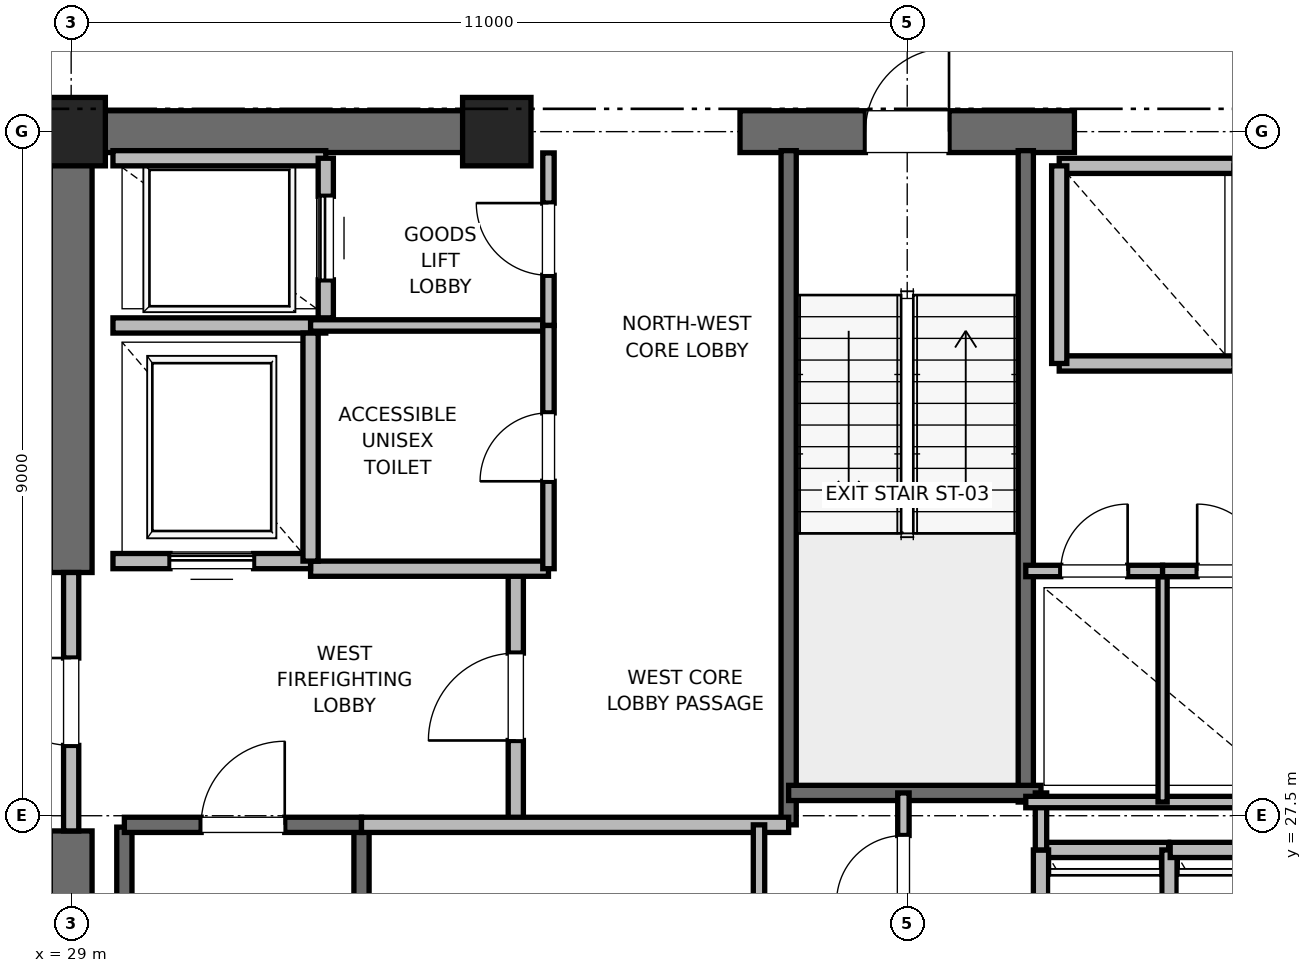
"""IFC4 building model, lengths in metres.
Left out: names, types, materials, properties, quantities, classifications, styles, units other than length and angle.
Written with IfcOpenShell. Run it as: python <this file> out.ifc"""

import sys

from ifc_helpers import new_model, si_unit, direction, frame, frame_2d, origin, origin_2d, place, context, subcontext, project, spatial, rectangle, extrude, element, fill, save


model = new_model("IFC4")
c1 = context("Model", 3, precision=1e-05, world=origin(), true_north=direction((0.0, 1.0)))
c2 = subcontext(c1, "Body", "Model", "MODEL_VIEW")
j1 = project(units=[si_unit("LENGTHUNIT", "METRE"), si_unit("PLANEANGLEUNIT", "RADIAN")], contexts=[c1])
p1 = place(None, origin())
s1 = spatial("IfcSite", under=j1, at=p1, CompositionType="ELEMENT")
p2 = place(p1, origin())
s2 = spatial("IfcBuilding", under=s1, at=p2, CompositionType="ELEMENT")
p3 = place(p2, frame((0.0, 0.0, 205.2)))
s3 = spatial("IfcBuildingStorey", under=s2, at=p3, CompositionType="ELEMENT", Elevation=205.2)
for number, where, z_axis, x_axis in (
    (1, (29.0, 36.5, 0.0), (0.0, 0.0, 1.0), (1.0, 0.0, 0.0)),
    (2, (34.6, 36.5, 0.0), (0.0, 0.0, 1.0), (1.0, 0.0, 0.0)),
):
    element("IfcColumn", number, at=place(p3, frame(where, z_axis=z_axis, x_axis=x_axis)), inside=s3, PredefinedType="PILASTER", context=c2, shape_type="SweptSolid", body=[
        extrude(rectangle(XDim=0.9, YDim=0.9, at=origin_2d()), origin(), (0.0, 0.0, 1.0), 4.0),
    ])
p4 = place(p3, frame((29.0, 36.5, 0.0), z_axis=(0.0, 0.0, 1.0), x_axis=(1.0, 0.0, 0.0)))
e3 = element("IfcWall", 3, at=p4, inside=s3, PredefinedType="SHEAR", context=c2, shape_type="SweptSolid", body=[
    extrude(rectangle(XDim=5.8, YDim=0.55, at=frame_2d((2.9, 0.0))), origin(), (0.0, 0.0, 1.0), 3.775),
])
p5 = place(p3, frame((37.8, 36.5, 0.0), z_axis=(0.0, 0.0, 1.0), x_axis=(1.0, 0.0, 0.0)))
e4 = element("IfcWall", 4, at=p5, inside=s3, PredefinedType="SHEAR", context=c2, shape_type="SweptSolid", body=[
    extrude(rectangle(XDim=4.4, YDim=0.55, at=frame_2d((2.2, 0.0))), origin(), (0.0, 0.0, 1.0), 3.775),
])
p6 = place(p5, frame((1.65, 0.0, 0.0)))
e5 = element("IfcOpeningElement", 5, at=p6, cuts=e4, PredefinedType="OPENING", context=c2, shape_type="SweptSolid", body=[
    extrude(rectangle(XDim=1.1, YDim=2.15, at=frame_2d((0.55, 1.075))), frame((0.0, 0.275, 0.0), z_axis=(0.0, -1.0, 0.0), x_axis=(1.0, 0.0, 0.0)), (0.0, 0.0, 1.0), 0.55),
])
p7 = place(p3, frame((29.0, 18.5, 0.0), z_axis=(0.0, 0.0, 1.0), x_axis=(0.0, 1.0, 0.0)))
e6 = element("IfcWall", 6, at=p7, inside=s3, PredefinedType="SHEAR", context=c2, shape_type="SweptSolid", body=[
    extrude(rectangle(XDim=8.8, YDim=0.55, at=frame_2d((4.4, 0.0))), origin(), (0.0, 0.0, 1.0), 3.775),
])
p8 = place(p3, frame((29.0, 30.7, 0.0), z_axis=(0.0, 0.0, 1.0), x_axis=(0.0, 1.0, 0.0)))
e7 = element("IfcWall", 7, at=p8, inside=s3, PredefinedType="SHEAR", context=c2, shape_type="SweptSolid", body=[
    extrude(rectangle(XDim=5.8, YDim=0.55, at=frame_2d((2.9, 0.0))), origin(), (0.0, 0.0, 1.0), 3.775),
])
p9 = place(p3, frame((29.7, 19.2, 0.0), z_axis=(0.0, 0.0, 1.0), x_axis=(0.0, 1.0, 0.0)))
e8 = element("IfcWall", 8, at=p9, inside=s3, PredefinedType="SOLIDWALL", context=c2, shape_type="SweptSolid", body=[
    extrude(rectangle(XDim=8.15, YDim=0.2, at=frame_2d((4.075, 0.0))), origin(), (0.0, 0.0, 1.0), 3.775),
])
p10 = place(p3, frame((32.82, 18.6, 0.0), z_axis=(0.0, 0.0, 1.0), x_axis=(0.0, 1.0, 0.0)))
e9 = element("IfcWall", 9, at=p10, inside=s3, PredefinedType="SOLIDWALL", context=c2, shape_type="SweptSolid", body=[
    extrude(rectangle(XDim=8.78, YDim=0.2, at=frame_2d((4.39, 0.0))), origin(), (0.0, 0.0, 1.0), 3.775),
])
p11 = place(p3, frame((29.7, 27.38, 0.0), z_axis=(0.0, 0.0, 1.0), x_axis=(1.0, 0.0, 0.0)))
e10 = element("IfcWall", 10, at=p11, inside=s3, PredefinedType="SOLIDWALL", context=c2, shape_type="SweptSolid", body=[
    extrude(rectangle(XDim=3.12, YDim=0.2, at=frame_2d((1.56, 0.0))), origin(), (0.0, 0.0, 1.0), 3.775),
])
p12 = place(p11, frame((1.01, 0.0, 0.0)))
e11 = element("IfcOpeningElement", 11, at=p12, cuts=e10, PredefinedType="OPENING", context=c2, shape_type="SweptSolid", body=[
    extrude(rectangle(XDim=1.1, YDim=2.15, at=frame_2d((0.55, 1.075))), frame((0.0, 0.1, 0.0), z_axis=(0.0, -1.0, 0.0), x_axis=(1.0, 0.0, 0.0)), (0.0, 0.0, 1.0), 0.2),
])
p13 = place(p3, frame((38.44, 27.38, 0.0), z_axis=(0.0, 0.0, 1.0), x_axis=(0.0, 1.0, 0.0)))
e12 = element("IfcWall", 12, at=p13, inside=s3, PredefinedType="SOLIDWALL", context=c2, shape_type="SweptSolid", body=[
    extrude(rectangle(XDim=8.87, YDim=0.2, at=frame_2d((4.435, 0.0))), origin(), (0.0, 0.0, 1.0), 3.775),
])
p14 = place(p3, frame((41.56, 27.68, 0.0), z_axis=(0.0, 0.0, 1.0), x_axis=(0.0, 1.0, 0.0)))
e13 = element("IfcWall", 13, at=p14, inside=s3, PredefinedType="SOLIDWALL", context=c2, shape_type="SweptSolid", body=[
    extrude(rectangle(XDim=8.57, YDim=0.2, at=frame_2d((4.285, 0.0))), origin(), (0.0, 0.0, 1.0), 3.775),
])
p15 = place(p3, frame((38.44, 27.8, 0.0), z_axis=(0.0, 0.0, 1.0), x_axis=(1.0, 0.0, 0.0)))
e14 = element("IfcWall", 14, at=p15, inside=s3, PredefinedType="SOLIDWALL", context=c2, shape_type="SweptSolid", body=[
    extrude(rectangle(XDim=3.32, YDim=0.2, at=frame_2d((1.66, 0.0))), origin(), (0.0, 0.0, 1.0), 3.775),
])
p16 = place(p3, frame((34.85, 27.38, 0.0), z_axis=(0.0, 0.0, 1.0), x_axis=(0.0, 1.0, 0.0)))
e15 = element("IfcWall", 15, at=p16, inside=s3, PredefinedType="PARTITIONING", context=c2, shape_type="SweptSolid", body=[
    extrude(rectangle(XDim=3.37, YDim=0.2, at=frame_2d((1.685, 0.0))), origin(), (0.0, 0.0, 1.0), 3.775),
])
p17 = place(p16, frame((1.11, 0.0, 0.0)))
e16 = element("IfcOpeningElement", 16, at=p17, cuts=e15, PredefinedType="OPENING", context=c2, shape_type="SweptSolid", body=[
    extrude(rectangle(XDim=1.15, YDim=2.2, at=frame_2d((0.575, 1.1))), frame((0.0, 0.1, 0.0), z_axis=(0.0, -1.0, 0.0), x_axis=(1.0, 0.0, 0.0)), (0.0, 0.0, 1.0), 0.2),
])
p18 = place(p3, frame((29.0, 27.3, 0.0), z_axis=(0.0, 0.0, 1.0), x_axis=(0.0, 1.0, 0.0)))
e17 = element("IfcWall", 17, at=p18, inside=s3, PredefinedType="PARTITIONING", context=c2, shape_type="SweptSolid", body=[
    extrude(rectangle(XDim=3.4, YDim=0.2, at=frame_2d((1.7, 0.0))), origin(), (0.0, 0.0, 1.0), 2.755),
])
p19 = place(p18, frame((1.125, 0.0, 0.0)))
e18 = element("IfcOpeningElement", 18, at=p19, cuts=e17, PredefinedType="OPENING", context=c2, shape_type="SweptSolid", body=[
    extrude(rectangle(XDim=1.15, YDim=2.2, at=frame_2d((0.575, 1.1))), frame((0.0, 0.1, 0.0), z_axis=(0.0, -1.0, 0.0), x_axis=(1.0, 0.0, 0.0)), (0.0, 0.0, 1.0), 0.2),
])
p20 = place(p3, frame((32.82, 27.38, 0.0), z_axis=(0.0, 0.0, 1.0), x_axis=(1.0, 0.0, 0.0)))
e19 = element("IfcWall", 19, at=p20, inside=s3, PredefinedType="PARTITIONING", context=c2, shape_type="SweptSolid", body=[
    extrude(rectangle(XDim=5.62, YDim=0.2, at=frame_2d((2.81, 0.0))), origin(), (0.0, 0.0, 1.0), 3.775),
])
p21 = place(p3, frame((32.15, 30.75, 0.0), z_axis=(0.0, 0.0, 1.0), x_axis=(1.0, 0.0, 0.0)))
e20 = element("IfcWall", 20, at=p21, inside=s3, PredefinedType="PARTITIONING", context=c2, shape_type="SweptSolid", body=[
    extrude(rectangle(XDim=3.13, YDim=0.2, at=frame_2d((1.565, 0.0))), origin(), (0.0, 0.0, 1.0), 3.775),
])
p22 = place(p3, frame((29.55, 30.85, 0.0), z_axis=(0.0, 0.0, 1.0), x_axis=(1.0, 0.0, 0.0)))
e21 = element("IfcWall", 21, at=p22, inside=s3, PredefinedType="SOLIDWALL", context=c2, shape_type="SweptSolid", body=[
    extrude(rectangle(XDim=2.6, YDim=0.2, at=frame_2d((1.3, 0.0))), origin(), (0.0, 0.0, 1.0), 2.755),
])
p23 = place(p22, frame((0.75, 0.0, 0.0)))
e22 = element("IfcOpeningElement", 22, at=p23, cuts=e21, PredefinedType="OPENING", context=c2, shape_type="SweptSolid", body=[
    extrude(rectangle(XDim=1.1, YDim=2.2, at=frame_2d((0.55, 1.1))), frame((0.0, 0.1, 0.0), z_axis=(0.0, -1.0, 0.0), x_axis=(1.0, 0.0, 0.0)), (0.0, 0.0, 1.0), 0.2),
])
p24 = place(p3, frame((29.55, 33.95, 0.0), z_axis=(0.0, 0.0, 1.0), x_axis=(1.0, 0.0, 0.0)))
e23 = element("IfcWall", 23, at=p24, inside=s3, PredefinedType="SOLIDWALL", context=c2, shape_type="SweptSolid", body=[
    extrude(rectangle(XDim=2.8, YDim=0.2, at=frame_2d((1.4, 0.0))), origin(), (0.0, 0.0, 1.0), 3.775),
])
p25 = place(p3, frame((32.15, 30.85, 0.0), z_axis=(0.0, 0.0, 1.0), x_axis=(0.0, 1.0, 0.0)))
e24 = element("IfcWall", 24, at=p25, inside=s3, PredefinedType="SOLIDWALL", context=c2, shape_type="SweptSolid", body=[
    extrude(rectangle(XDim=3.0, YDim=0.2, at=frame_2d((1.5, 0.0))), origin(), (0.0, 0.0, 1.0), 3.775),
])
p26 = place(p3, frame((32.35, 36.15, 0.0), z_axis=(0.0, 0.0, 1.0), x_axis=(-1.0, 0.0, 0.0)))
e25 = element("IfcWall", 25, at=p26, inside=s3, PredefinedType="SOLIDWALL", context=c2, shape_type="SweptSolid", body=[
    extrude(rectangle(XDim=2.8, YDim=0.2, at=frame_2d((1.4, 0.0))), origin(), (0.0, 0.0, 1.0), 3.062),
])
p27 = place(p3, frame((32.35, 34.05, 0.0), z_axis=(0.0, 0.0, 1.0), x_axis=(0.0, 1.0, 0.0)))
e26 = element("IfcWall", 26, at=p27, inside=s3, PredefinedType="SOLIDWALL", context=c2, shape_type="SweptSolid", body=[
    extrude(rectangle(XDim=2.1, YDim=0.2, at=frame_2d((1.05, 0.0))), origin(), (0.0, 0.0, 1.0), 3.775),
])
p28 = place(p27, frame((0.5, 0.0, 0.0)))
e27 = element("IfcOpeningElement", 27, at=p28, cuts=e26, PredefinedType="OPENING", context=c2, shape_type="SweptSolid", body=[
    extrude(rectangle(XDim=1.1, YDim=2.2, at=frame_2d((0.55, 1.1))), frame((0.0, 0.1, 0.0), z_axis=(0.0, -1.0, 0.0), x_axis=(1.0, 0.0, 0.0)), (0.0, 0.0, 1.0), 0.2),
])
p29 = place(p3, frame((43.44, 27.05, 0.0), z_axis=(0.0, 0.0, 1.0), x_axis=(-1.0, 0.0, 0.0)))
e28 = element("IfcWall", 28, at=p29, inside=s3, PredefinedType="SOLIDWALL", context=c2, shape_type="SweptSolid", body=[
    extrude(rectangle(XDim=1.68, YDim=0.2, at=frame_2d((0.84, 0.0))), origin(), (0.0, 0.0, 1.0), 3.775),
])
for number, where, z_axis, x_axis in (
    (29, (41.76, 27.05, 0.0), (0.0, 0.0, 1.0), (0.0, -1.0, 0.0)),
    (30, (43.45, 24.45, 0.0), (0.0, 0.0, 1.0), (0.0, 1.0, 0.0)),
):
    element("IfcWall", number, at=place(p3, frame(where, z_axis=z_axis, x_axis=x_axis)), inside=s3, PredefinedType="SOLIDWALL", context=c2, shape_type="SweptSolid", body=[
        extrude(rectangle(XDim=2.6, YDim=0.2, at=frame_2d((1.3, 0.0))), origin(), (0.0, 0.0, 1.0), 3.775),
    ])
p30 = place(p3, frame((45.12, 27.05, 0.0), z_axis=(0.0, 0.0, 1.0), x_axis=(-1.0, 0.0, 0.0)))
e31 = element("IfcWall", 31, at=p30, inside=s3, PredefinedType="SOLIDWALL", context=c2, shape_type="SweptSolid", body=[
    extrude(rectangle(XDim=1.66, YDim=0.2, at=frame_2d((0.83, 0.0))), origin(), (0.0, 0.0, 1.0), 3.775),
])
p31 = place(p3, frame((42.0, 33.45, 0.0), z_axis=(0.0, 0.0, 1.0), x_axis=(1.0, 0.0, 0.0)))
e32 = element("IfcWall", 32, at=p31, inside=s3, PredefinedType="SOLIDWALL", context=c2, shape_type="SweptSolid", body=[
    extrude(rectangle(XDim=2.3, YDim=0.2, at=frame_2d((1.15, 0.0))), origin(), (0.0, 0.0, 1.0), 3.775),
])
p32 = place(p3, frame((44.3, 36.05, 0.0), z_axis=(0.0, 0.0, 1.0), x_axis=(-1.0, 0.0, 0.0)))
e33 = element("IfcWall", 33, at=p32, inside=s3, PredefinedType="SOLIDWALL", context=c2, shape_type="SweptSolid", body=[
    extrude(rectangle(XDim=2.3, YDim=0.2, at=frame_2d((1.15, 0.0))), origin(), (0.0, 0.0, 1.0), 2.755),
])
p33 = place(p3, frame((42.0, 36.05, 0.0), z_axis=(0.0, 0.0, 1.0), x_axis=(0.0, -1.0, 0.0)))
e34 = element("IfcWall", 34, at=p33, inside=s3, PredefinedType="SOLIDWALL", context=c2, shape_type="SweptSolid", body=[
    extrude(rectangle(XDim=2.6, YDim=0.2, at=frame_2d((1.3, 0.0))), origin(), (0.0, 0.0, 1.0), 2.755),
])
p34 = place(p3, frame((41.76, 27.05, 0.0), z_axis=(0.0, 0.0, 1.0), x_axis=(0.0, 1.0, 0.0)))
e35 = element("IfcWall", 35, at=p34, inside=s3, PredefinedType="PARTITIONING", context=c2, shape_type="SweptSolid", body=[
    extrude(rectangle(XDim=0.75, YDim=0.15, at=frame_2d((0.375, 0.0))), origin(), (0.0, 0.0, 1.0), 2.85),
])
p35 = place(p3, frame((39.95, 25.8, 0.0), z_axis=(0.0, 0.0, 1.0), x_axis=(0.0, 1.0, 0.0)))
e36 = element("IfcWall", 36, at=p35, inside=s3, PredefinedType="PARTITIONING", context=c2, shape_type="SweptSolid", body=[
    extrude(rectangle(XDim=2.0, YDim=0.15, at=frame_2d((1.0, 0.0))), origin(), (0.0, 0.0, 1.0), 2.85),
])
p36 = place(p35, frame((0.56, 0.0, 0.0)))
e37 = element("IfcOpeningElement", 37, at=p36, cuts=e36, PredefinedType="OPENING", context=c2, shape_type="SweptSolid", body=[
    extrude(rectangle(XDim=0.88, YDim=2.1, at=frame_2d((0.44, 1.05))), frame((0.0, 0.075, 0.0), z_axis=(0.0, -1.0, 0.0), x_axis=(1.0, 0.0, 0.0)), (0.0, 0.0, 1.0), 0.15),
])
p37 = place(p3, frame((32.15, 33.95, 0.0), z_axis=(0.0, 0.0, 1.0), x_axis=(1.0, 0.0, 0.0)))
e38 = element("IfcWall", 38, at=p37, inside=s3, PredefinedType="PARTITIONING", context=c2, shape_type="SweptSolid", body=[
    extrude(rectangle(XDim=3.13, YDim=0.15, at=frame_2d((1.565, 0.0))), origin(), (0.0, 0.0, 1.0), 2.85),
])
p38 = place(p3, frame((35.28, 33.95, 0.0), z_axis=(0.0, 0.0, 1.0), x_axis=(0.0, 1.0, 0.0)))
e39 = element("IfcWall", 39, at=p38, inside=s3, PredefinedType="PARTITIONING", context=c2, shape_type="SweptSolid", body=[
    extrude(rectangle(XDim=2.27, YDim=0.15, at=frame_2d((1.135, 0.0))), origin(), (0.0, 0.0, 1.0), 2.755),
])
p39 = place(p38, frame((0.66, 0.0, 0.0)))
e40 = element("IfcOpeningElement", 40, at=p39, cuts=e39, PredefinedType="OPENING", context=c2, shape_type="SweptSolid", body=[
    extrude(rectangle(XDim=0.95, YDim=2.15, at=frame_2d((0.475, 1.075))), frame((0.0, 0.075, 0.0), z_axis=(0.0, -1.0, 0.0), x_axis=(1.0, 0.0, 0.0)), (0.0, 0.0, 1.0), 0.15),
])
p40 = place(p3, frame((35.28, 30.75, 0.0), z_axis=(0.0, 0.0, 1.0), x_axis=(0.0, 1.0, 0.0)))
e41 = element("IfcWall", 41, at=p40, inside=s3, PredefinedType="PARTITIONING", context=c2, shape_type="SweptSolid", body=[
    extrude(rectangle(XDim=3.2, YDim=0.15, at=frame_2d((1.6, 0.0))), origin(), (0.0, 0.0, 1.0), 2.85),
])
p41 = place(p40, frame((1.15, 0.0, 0.0)))
e42 = element("IfcOpeningElement", 42, at=p41, cuts=e41, PredefinedType="OPENING", context=c2, shape_type="SweptSolid", body=[
    extrude(rectangle(XDim=0.9, YDim=2.1, at=frame_2d((0.45, 1.05))), frame((0.0, 0.075, 0.0), z_axis=(0.0, -1.0, 0.0), x_axis=(1.0, 0.0, 0.0)), (0.0, 0.0, 1.0), 0.15),
])
p42 = place(p3, frame((38.05, 23.06, 0.0), z_axis=(0.0, 0.0, 1.0), x_axis=(0.0, 1.0, 0.0)))
e43 = element("IfcWall", 43, at=p42, inside=s3, PredefinedType="PARTITIONING", context=c2, shape_type="SweptSolid", body=[
    extrude(rectangle(XDim=4.32, YDim=0.15, at=frame_2d((2.16, 0.0))), origin(), (0.0, 0.0, 1.0), 2.85),
])
p43 = place(p42, frame((1.66, 0.0, 0.0)))
e44 = element("IfcOpeningElement", 44, at=p43, cuts=e43, PredefinedType="OPENING", context=c2, shape_type="SweptSolid", body=[
    extrude(rectangle(XDim=1.0, YDim=2.15, at=frame_2d((0.5, 1.075))), frame((0.0, 0.075, 0.0), z_axis=(0.0, -1.0, 0.0), x_axis=(1.0, 0.0, 0.0)), (0.0, 0.0, 1.0), 0.15),
])
p44 = place(p3, frame((41.56, 27.68, 0.0), z_axis=(0.0, 0.0, 1.0), x_axis=(1.0, 0.0, 0.0)))
e45 = element("IfcWall", 45, at=p44, inside=s3, PredefinedType="PARTITIONING", context=c2, shape_type="SweptSolid", body=[
    extrude(rectangle(XDim=3.59, YDim=0.15, at=frame_2d((1.795, 0.0))), origin(), (0.0, 0.0, 1.0), 2.85),
])
p45 = place(p3, frame((43.36, 27.68, 0.0), z_axis=(0.0, 0.0, 1.0), x_axis=(0.0, 1.0, 0.0)))
e46 = element("IfcWall", 46, at=p45, inside=s3, PredefinedType="PARTITIONING", context=c2, shape_type="SweptSolid", body=[
    extrude(rectangle(XDim=3.04, YDim=0.12, at=frame_2d((1.52, 0.0))), origin(), (0.0, 0.0, 1.0), 2.85),
])
p46 = place(p3, frame((41.56, 30.72, 0.0), z_axis=(0.0, 0.0, 1.0), x_axis=(1.0, 0.0, 0.0)))
e47 = element("IfcWall", 47, at=p46, inside=s3, PredefinedType="PARTITIONING", context=c2, shape_type="SweptSolid", body=[
    extrude(rectangle(XDim=1.8, YDim=0.15, at=frame_2d((0.9, 0.0))), origin(), (0.0, 0.0, 1.0), 2.85),
])
p47 = place(p46, frame((0.46, 0.0, 0.0)))
e48 = element("IfcOpeningElement", 48, at=p47, cuts=e47, PredefinedType="OPENING", context=c2, shape_type="SweptSolid", body=[
    extrude(rectangle(XDim=0.88, YDim=2.1, at=frame_2d((0.44, 1.05))), frame((0.0, 0.075, 0.0), z_axis=(0.0, -1.0, 0.0), x_axis=(1.0, 0.0, 0.0)), (0.0, 0.0, 1.0), 0.15),
])
p48 = place(p3, frame((43.36, 30.72, 0.0), z_axis=(0.0, 0.0, 1.0), x_axis=(1.0, 0.0, 0.0)))
e49 = element("IfcWall", 49, at=p48, inside=s3, PredefinedType="PARTITIONING", context=c2, shape_type="SweptSolid", body=[
    extrude(rectangle(XDim=1.79, YDim=0.15, at=frame_2d((0.895, 0.0))), origin(), (0.0, 0.0, 1.0), 2.85),
])
p49 = place(p48, frame((0.455, 0.0, 0.0)))
e50 = element("IfcOpeningElement", 50, at=p49, cuts=e49, PredefinedType="OPENING", context=c2, shape_type="SweptSolid", body=[
    extrude(rectangle(XDim=0.88, YDim=2.1, at=frame_2d((0.44, 1.05))), frame((0.0, 0.075, 0.0), z_axis=(0.0, -1.0, 0.0), x_axis=(1.0, 0.0, 0.0)), (0.0, 0.0, 1.0), 0.15),
])
p50 = place(p12, origin())
e51 = element("IfcDoor", 51, at=p50, inside=s3, OperationType="SINGLE_SWING_RIGHT", PredefinedType="DOOR", context=c2, shape_type="SweptSolid", body=[
    extrude(rectangle(XDim=1.1, YDim=2.15, at=frame_2d((0.55, 1.075))), frame((0.0, 0.025, 0.0), z_axis=(0.0, -1.0, 0.0), x_axis=(1.0, 0.0, 0.0)), (0.0, 0.0, 1.0), 0.05),
])
fill(e11, e51)
p51 = place(p6, origin())
e52 = element("IfcDoor", 52, at=p51, inside=s3, OperationType="SINGLE_SWING_RIGHT", PredefinedType="DOOR", context=c2, shape_type="SweptSolid", body=[
    extrude(rectangle(XDim=1.1, YDim=2.15, at=frame_2d((0.55, 1.075))), frame((0.0, 0.025, 0.0), z_axis=(0.0, -1.0, 0.0), x_axis=(1.0, 0.0, 0.0)), (0.0, 0.0, 1.0), 0.05),
])
fill(e5, e52)
p52 = place(p17, origin())
e53 = element("IfcDoor", 53, at=p52, inside=s3, OperationType="SINGLE_SWING_LEFT", PredefinedType="DOOR", context=c2, shape_type="SweptSolid", body=[
    extrude(rectangle(XDim=1.15, YDim=2.2, at=frame_2d((0.575, 1.1))), frame((0.0, 0.025, 0.0), z_axis=(0.0, -1.0, 0.0), x_axis=(1.0, 0.0, 0.0)), (0.0, 0.0, 1.0), 0.05),
])
fill(e16, e53)
p53 = place(p19, origin())
e54 = element("IfcDoor", 54, at=p53, inside=s3, OperationType="SINGLE_SWING_RIGHT", PredefinedType="DOOR", context=c2, shape_type="SweptSolid", body=[
    extrude(rectangle(XDim=1.15, YDim=2.2, at=frame_2d((0.575, 1.1))), frame((0.0, 0.025, 0.0), z_axis=(0.0, -1.0, 0.0), x_axis=(1.0, 0.0, 0.0)), (0.0, 0.0, 1.0), 0.05),
])
fill(e18, e54)
p54 = place(p23, origin())
e55 = element("IfcDoor", 55, at=p54, inside=s3, OperationType="SLIDING_TO_RIGHT", PredefinedType="DOOR", context=c2, shape_type="SweptSolid", body=[
    extrude(rectangle(XDim=1.1, YDim=2.2, at=frame_2d((0.55, 1.1))), frame((0.0, 0.025, 0.0), z_axis=(0.0, -1.0, 0.0), x_axis=(1.0, 0.0, 0.0)), (0.0, 0.0, 1.0), 0.05),
])
fill(e22, e55)
p55 = place(p28, origin())
e56 = element("IfcDoor", 56, at=p55, inside=s3, OperationType="SLIDING_TO_RIGHT", PredefinedType="DOOR", context=c2, shape_type="SweptSolid", body=[
    extrude(rectangle(XDim=1.1, YDim=2.2, at=frame_2d((0.55, 1.1))), frame((0.0, 0.025, 0.0), z_axis=(0.0, -1.0, 0.0), x_axis=(1.0, 0.0, 0.0)), (0.0, 0.0, 1.0), 0.05),
])
fill(e27, e56)
p56 = place(p36, origin())
e57 = element("IfcDoor", 57, at=p56, inside=s3, OperationType="SINGLE_SWING_LEFT", PredefinedType="DOOR", context=c2, shape_type="SweptSolid", body=[
    extrude(rectangle(XDim=0.88, YDim=2.1, at=frame_2d((0.44, 1.05))), frame((0.0, 0.025, 0.0), z_axis=(0.0, -1.0, 0.0), x_axis=(1.0, 0.0, 0.0)), (0.0, 0.0, 1.0), 0.05),
])
fill(e37, e57)
p57 = place(p39, origin())
e58 = element("IfcDoor", 58, at=p57, inside=s3, OperationType="SINGLE_SWING_RIGHT", PredefinedType="DOOR", context=c2, shape_type="SweptSolid", body=[
    extrude(rectangle(XDim=0.95, YDim=2.15, at=frame_2d((0.475, 1.075))), frame((0.0, 0.025, 0.0), z_axis=(0.0, -1.0, 0.0), x_axis=(1.0, 0.0, 0.0)), (0.0, 0.0, 1.0), 0.05),
])
fill(e40, e58)
p58 = place(p41, origin())
e59 = element("IfcDoor", 59, at=p58, inside=s3, OperationType="SINGLE_SWING_LEFT", PredefinedType="DOOR", context=c2, shape_type="SweptSolid", body=[
    extrude(rectangle(XDim=0.9, YDim=2.1, at=frame_2d((0.45, 1.05))), frame((0.0, 0.025, 0.0), z_axis=(0.0, -1.0, 0.0), x_axis=(1.0, 0.0, 0.0)), (0.0, 0.0, 1.0), 0.05),
])
fill(e42, e59)
p59 = place(p47, origin())
e60 = element("IfcDoor", 60, at=p59, inside=s3, OperationType="SINGLE_SWING_RIGHT", PredefinedType="DOOR", context=c2, shape_type="SweptSolid", body=[
    extrude(rectangle(XDim=0.88, YDim=2.1, at=frame_2d((0.44, 1.05))), frame((0.0, 0.025, 0.0), z_axis=(0.0, -1.0, 0.0), x_axis=(1.0, 0.0, 0.0)), (0.0, 0.0, 1.0), 0.05),
])
fill(e48, e60)
p60 = place(p49, origin())
e61 = element("IfcDoor", 61, at=p60, inside=s3, OperationType="SINGLE_SWING_LEFT", PredefinedType="DOOR", context=c2, shape_type="SweptSolid", body=[
    extrude(rectangle(XDim=0.88, YDim=2.1, at=frame_2d((0.44, 1.05))), frame((0.0, 0.025, 0.0), z_axis=(0.0, -1.0, 0.0), x_axis=(1.0, 0.0, 0.0)), (0.0, 0.0, 1.0), 0.05),
])
fill(e50, e61)
save(model, sys.argv[1])
